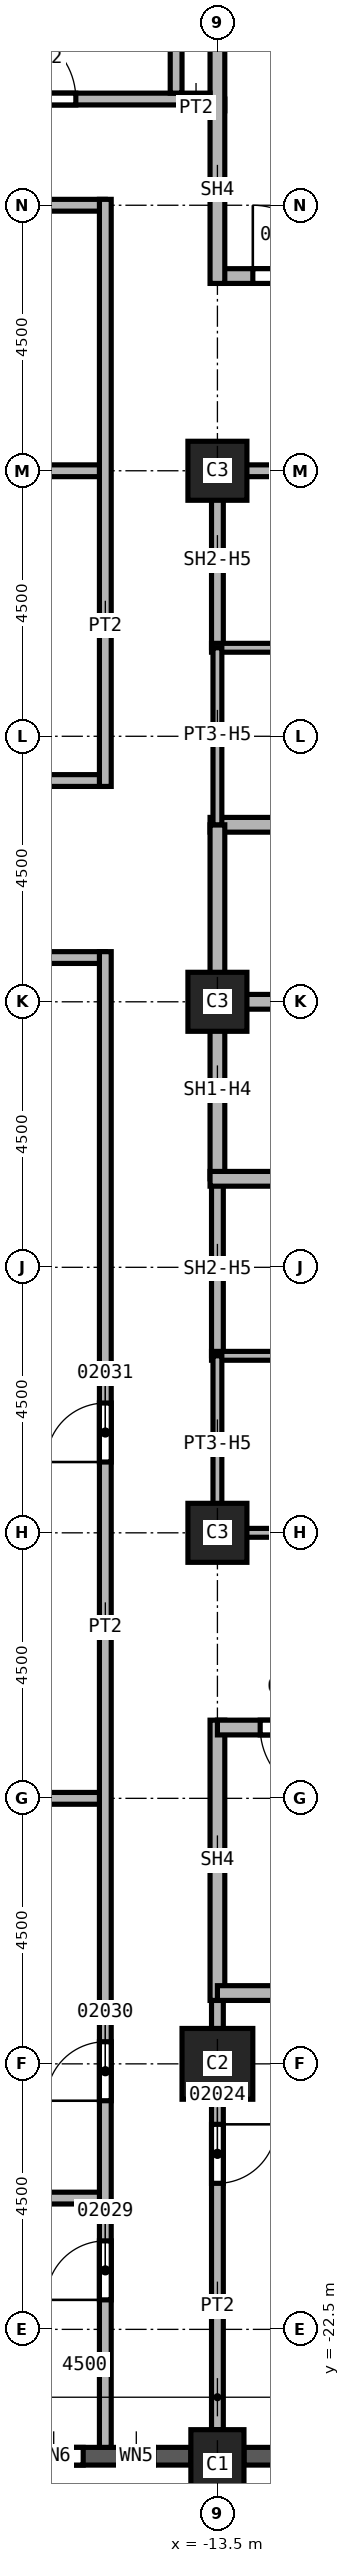
"""IFC4 building model, lengths in metres.
Left out: names, types, materials, properties, quantities, classifications, styles, units other than length and angle.
Written with IfcOpenShell. Run it as: python <this file> out.ifc"""

import sys

from ifc_helpers import new_model, si_unit, direction, frame, frame_2d, origin, origin_2d, place, context, subcontext, project, spatial, rectangle, extrude, element, fill, save


model = new_model("IFC4")
c1 = context("Model", 3, precision=1e-05, world=origin(), true_north=direction((0.0, 1.0)))
c2 = subcontext(c1, "Body", "Model", "MODEL_VIEW")
j1 = project(units=[si_unit("LENGTHUNIT", "METRE"), si_unit("PLANEANGLEUNIT", "RADIAN")], contexts=[c1])
p1 = place(None, origin())
s1 = spatial("IfcSite", under=j1, at=p1, CompositionType="ELEMENT")
p2 = place(p1, origin())
s2 = spatial("IfcBuilding", under=s1, at=p2, CompositionType="ELEMENT")
p3 = place(p2, frame((0.0, 0.0, 80.0)))
s3 = spatial("IfcBuildingStorey", under=s2, at=p3, CompositionType="ELEMENT", Elevation=80.0)
p4 = place(p3, frame((-13.5, -18.0, 0.0), z_axis=(0.0, 0.0, 1.0), x_axis=(1.0, 0.0, 0.0)))
e1 = element("IfcColumn", 1, at=p4, inside=s3, PredefinedType="COLUMN", context=c2, shape_type="SweptSolid", body=[
    extrude(rectangle(XDim=1.2, YDim=1.2, at=origin_2d()), origin(), (0.0, 0.0, 1.0), 3.7),
])
for number, where, z_axis, x_axis in (
    (2, (-13.5, 0.0, 0.0), (0.0, 0.0, 1.0), (1.0, 0.0, 0.0)),
    (3, (-13.5, 9.0, 0.0), (0.0, 0.0, 1.0), (1.0, 0.0, 0.0)),
    (4, (-13.5, -9.0, 0.0), (0.0, 0.0, 1.0), (1.0, 0.0, 0.0)),
):
    element("IfcColumn", number, at=place(p3, frame(where, z_axis=z_axis, x_axis=x_axis)), inside=s3, PredefinedType="COLUMN", context=c2, shape_type="SweptSolid", body=[
        extrude(rectangle(XDim=1.0, YDim=1.0, at=origin_2d()), origin(), (0.0, 0.0, 1.0), 3.7),
    ])
p5 = place(p3, frame((-13.5, -24.8, 0.0), z_axis=(0.0, 0.0, 1.0), x_axis=(1.0, 0.0, 0.0)))
e5 = element("IfcColumn", 5, at=p5, inside=s3, PredefinedType="COLUMN", context=c2, shape_type="SweptSolid", body=[
    extrude(rectangle(XDim=0.9, YDim=1.2, at=origin_2d()), origin(), (0.0, 0.0, 1.0), 3.7),
])
p6 = place(p3, frame((-17.55, -24.65, 0.0), z_axis=(0.0, 0.0, 1.0), x_axis=(1.0, 0.0, 0.0)))
e6 = element("IfcWall", 6, at=p6, inside=s3, PredefinedType="SOLIDWALL", context=c2, shape_type="SweptSolid", body=[
    extrude(rectangle(XDim=3.6, YDim=0.3, at=frame_2d((1.8, 0.0))), origin(), (0.0, 0.0, 1.0), 3.1),
])
p7 = place(p6, frame((0.775, 0.0, 0.8)))
e7 = element("IfcOpeningElement", 7, at=p7, cuts=e6, PredefinedType="OPENING", context=c2, shape_type="SweptSolid", body=[
    extrude(rectangle(XDim=1.0, YDim=1.95, at=frame_2d((0.5, 0.975))), frame((0.0, 0.15, 0.0), z_axis=(0.0, -1.0, 0.0), x_axis=(1.0, 0.0, 0.0)), (0.0, 0.0, 1.0), 0.3),
])
p8 = place(p6, frame((2.375, 0.0, 0.8)))
e8 = element("IfcOpeningElement", 8, at=p8, cuts=e6, PredefinedType="OPENING", context=c2, shape_type="SweptSolid", body=[
    extrude(rectangle(XDim=0.6, YDim=1.95, at=frame_2d((0.3, 0.975))), frame((0.0, 0.15, 0.0), z_axis=(0.0, -1.0, 0.0), x_axis=(1.0, 0.0, 0.0)), (0.0, 0.0, 1.0), 0.3),
])
p9 = place(p3, frame((-13.05, -24.65, 0.0), z_axis=(0.0, 0.0, 1.0), x_axis=(1.0, 0.0, 0.0)))
e9 = element("IfcWall", 9, at=p9, inside=s3, PredefinedType="SOLIDWALL", context=c2, shape_type="SweptSolid", body=[
    extrude(rectangle(XDim=3.6, YDim=0.3, at=frame_2d((1.8, 0.0))), origin(), (0.0, 0.0, 1.0), 3.1),
])
p10 = place(p9, frame((0.6, 0.0, 0.8)))
e10 = element("IfcOpeningElement", 10, at=p10, cuts=e9, PredefinedType="OPENING", context=c2, shape_type="SweptSolid", body=[
    extrude(rectangle(XDim=2.4, YDim=1.95, at=frame_2d((1.2, 0.975))), frame((0.0, 0.15, 0.0), z_axis=(0.0, -1.0, 0.0), x_axis=(1.0, 0.0, 0.0)), (0.0, 0.0, 1.0), 0.3),
])
p11 = place(p3, frame((-33.85, 3.75, 0.0), z_axis=(0.0, 0.0, 1.0), x_axis=(1.0, 0.0, 0.0)))
e11 = element("IfcWall", 11, at=p11, inside=s3, PredefinedType="PARTITIONING", context=c2, shape_type="SweptSolid", body=[
    extrude(rectangle(XDim=18.45, YDim=0.2, at=frame_2d((9.225, 0.0))), origin(), (0.0, 0.0, 1.0), 3.7),
])
p12 = place(p11, frame((9.4, 0.0, 0.0)))
e12 = element("IfcOpeningElement", 12, at=p12, cuts=e11, PredefinedType="OPENING", context=c2, shape_type="SweptSolid", body=[
    extrude(rectangle(XDim=1.0, YDim=2.1, at=frame_2d((0.5, 1.05))), frame((0.0, 0.1, 0.0), z_axis=(0.0, -1.0, 0.0), x_axis=(1.0, 0.0, 0.0)), (0.0, 0.0, 1.0), 0.2),
])
p13 = place(p3, frame((-15.4, 0.75, 0.0), z_axis=(0.0, 0.0, 1.0), x_axis=(-1.0, 0.0, 0.0)))
e13 = element("IfcWall", 13, at=p13, inside=s3, PredefinedType="PARTITIONING", context=c2, shape_type="SweptSolid", body=[
    extrude(rectangle(XDim=18.45, YDim=0.2, at=frame_2d((9.225, 0.0))), origin(), (0.0, 0.0, 1.0), 3.7),
])
p14 = place(p13, frame((12.35, 0.0, 0.0)))
e14 = element("IfcOpeningElement", 14, at=p14, cuts=e13, PredefinedType="OPENING", context=c2, shape_type="SweptSolid", body=[
    extrude(rectangle(XDim=1.0, YDim=2.1, at=frame_2d((0.5, 1.05))), frame((0.0, 0.1, 0.0), z_axis=(0.0, -1.0, 0.0), x_axis=(1.0, 0.0, 0.0)), (0.0, 0.0, 1.0), 0.2),
])
for number, where, z_axis, x_axis in (
    (15, (-27.1, -13.5, 0.0), (0.0, 0.0, 1.0), (1.0, 0.0, 0.0)),
    (16, (-27.1, 9.0, 0.0), (0.0, 0.0, 1.0), (1.0, 0.0, 0.0)),
):
    element("IfcWall", number, at=place(p3, frame(where, z_axis=z_axis, x_axis=x_axis)), inside=s3, PredefinedType="PARTITIONING", context=c2, shape_type="SweptSolid", body=[
        extrude(rectangle(XDim=11.7, YDim=0.2, at=frame_2d((5.85, 0.0))), origin(), (0.0, 0.0, 1.0), 3.7),
    ])
p15 = place(p3, frame((-24.3, -20.275, 0.0), z_axis=(0.0, 0.0, 1.0), x_axis=(1.0, 0.0, 0.0)))
e17 = element("IfcWall", 17, at=p15, inside=s3, PredefinedType="PARTITIONING", context=c2, shape_type="SweptSolid", body=[
    extrude(rectangle(XDim=8.9, YDim=0.2, at=frame_2d((4.45, 0.0))), origin(), (0.0, 0.0, 1.0), 3.7),
])
p16 = place(p3, frame((-15.4, 13.5, 0.0), z_axis=(0.0, 0.0, 1.0), x_axis=(-1.0, 0.0, 0.0)))
e18 = element("IfcWall", 18, at=p16, inside=s3, PredefinedType="PARTITIONING", context=c2, shape_type="SweptSolid", body=[
    extrude(rectangle(XDim=6.6, YDim=0.2, at=frame_2d((3.3, 0.0))), origin(), (0.0, 0.0, 1.0), 3.7),
])
p17 = place(p16, frame((4.0, 0.0, 0.0)))
e19 = element("IfcOpeningElement", 19, at=p17, cuts=e18, PredefinedType="OPENING", context=c2, shape_type="SweptSolid", body=[
    extrude(rectangle(XDim=1.0, YDim=2.1, at=frame_2d((0.5, 1.05))), frame((0.0, 0.1, 0.0), z_axis=(0.0, -1.0, 0.0), x_axis=(1.0, 0.0, 0.0)), (0.0, 0.0, 1.0), 0.2),
])
p18 = place(p3, frame((-15.4, -24.5, 0.0), z_axis=(0.0, 0.0, 1.0), x_axis=(0.0, 1.0, 0.0)))
e20 = element("IfcWall", 20, at=p18, inside=s3, PredefinedType="PARTITIONING", context=c2, shape_type="SweptSolid", body=[
    extrude(rectangle(XDim=25.35, YDim=0.2, at=frame_2d((12.675, 0.0))), origin(), (0.0, 0.0, 1.0), 3.7),
])
p19 = place(p18, frame((2.5, 0.0, 0.0)))
e21 = element("IfcOpeningElement", 21, at=p19, cuts=e20, PredefinedType="OPENING", context=c2, shape_type="SweptSolid", body=[
    extrude(rectangle(XDim=1.0, YDim=2.1, at=frame_2d((0.5, 1.05))), frame((0.0, 0.1, 0.0), z_axis=(0.0, -1.0, 0.0), x_axis=(1.0, 0.0, 0.0)), (0.0, 0.0, 1.0), 0.2),
])
p20 = place(p18, frame((5.875, 0.0, 0.0)))
e22 = element("IfcOpeningElement", 22, at=p20, cuts=e20, PredefinedType="OPENING", context=c2, shape_type="SweptSolid", body=[
    extrude(rectangle(XDim=1.0, YDim=2.1, at=frame_2d((0.5, 1.05))), frame((0.0, 0.1, 0.0), z_axis=(0.0, -1.0, 0.0), x_axis=(1.0, 0.0, 0.0)), (0.0, 0.0, 1.0), 0.2),
])
p21 = place(p18, frame((16.7, 0.0, 0.0)))
e23 = element("IfcOpeningElement", 23, at=p21, cuts=e20, PredefinedType="OPENING", context=c2, shape_type="SweptSolid", body=[
    extrude(rectangle(XDim=1.0, YDim=2.1, at=frame_2d((0.5, 1.05))), frame((0.0, 0.1, 0.0), z_axis=(0.0, -1.0, 0.0), x_axis=(1.0, 0.0, 0.0)), (0.0, 0.0, 1.0), 0.2),
])
p22 = place(p3, frame((-15.4, 3.65, 0.0), z_axis=(0.0, 0.0, 1.0), x_axis=(0.0, 1.0, 0.0)))
e24 = element("IfcWall", 24, at=p22, inside=s3, PredefinedType="PARTITIONING", context=c2, shape_type="SweptSolid", body=[
    extrude(rectangle(XDim=9.95, YDim=0.2, at=frame_2d((4.975, 0.0))), origin(), (0.0, 0.0, 1.0), 3.7),
])
p23 = place(p3, frame((-14.1, 15.2, 0.0), z_axis=(0.0, 0.0, 1.0), x_axis=(1.0, 0.0, 0.0)))
e25 = element("IfcWall", 25, at=p23, inside=s3, PredefinedType="PARTITIONING", context=c2, shape_type="SweptSolid", body=[
    extrude(rectangle(XDim=0.725, YDim=0.2, at=frame_2d((0.363, 0.0))), origin(), (0.0, 0.0, 1.0), 3.7),
])
p24 = place(p3, frame((-13.5, -16.675, 0.0), z_axis=(0.0, 0.0, 1.0), x_axis=(0.0, -1.0, 0.0)))
e26 = element("IfcWall", 26, at=p24, inside=s3, PredefinedType="PARTITIONING", context=c2, shape_type="SweptSolid", body=[
    extrude(rectangle(XDim=7.525, YDim=0.2, at=frame_2d((3.762, 0.0))), origin(), (0.0, 0.0, 1.0), 3.7),
])
p25 = place(p24, frame((2.35, 0.0, 0.0)))
e27 = element("IfcOpeningElement", 27, at=p25, cuts=e26, PredefinedType="OPENING", context=c2, shape_type="SweptSolid", body=[
    extrude(rectangle(XDim=1.0, YDim=2.1, at=frame_2d((0.5, 1.05))), frame((0.0, 0.1, 0.0), z_axis=(0.0, -1.0, 0.0), x_axis=(1.0, 0.0, 0.0)), (0.0, 0.0, 1.0), 0.2),
])
p26 = place(p3, frame((-13.5, -6.0, 0.0), z_axis=(0.0, 0.0, 1.0), x_axis=(0.0, 1.0, 0.0)))
e28 = element("IfcWall", 28, at=p26, inside=s3, PredefinedType="SOLIDWALL", context=c2, shape_type="SweptSolid", body=[
    extrude(rectangle(XDim=3.0, YDim=0.2, at=frame_2d((1.5, 0.0))), origin(), (0.0, 0.0, 1.0), 2.938),
])
p27 = place(p3, frame((-13.5, 6.0, 0.0), z_axis=(0.0, 0.0, 1.0), x_axis=(0.0, 1.0, 0.0)))
e29 = element("IfcWall", 29, at=p27, inside=s3, PredefinedType="SOLIDWALL", context=c2, shape_type="SweptSolid", body=[
    extrude(rectangle(XDim=3.1, YDim=0.2, at=frame_2d((1.55, 0.0))), origin(), (0.0, 0.0, 1.0), 2.938),
])
p28 = place(p3, frame((-13.5, 9.0, 0.0), z_axis=(0.0, 0.0, 1.0), x_axis=(1.0, 0.0, 0.0)))
e30 = element("IfcWall", 30, at=p28, inside=s3, PredefinedType="SOLIDWALL", context=c2, shape_type="SweptSolid", body=[
    extrude(rectangle(XDim=3.0, YDim=0.2, at=frame_2d((1.5, 0.0))), origin(), (0.0, 0.0, 1.0), 2.938),
])
p29 = place(p3, frame((-13.625, 0.0, 0.0), z_axis=(0.0, 0.0, 1.0), x_axis=(1.0, 0.0, 0.0)))
e31 = element("IfcWall", 31, at=p29, inside=s3, PredefinedType="SOLIDWALL", context=c2, shape_type="SweptSolid", body=[
    extrude(rectangle(XDim=3.125, YDim=0.25, at=frame_2d((1.562, 0.0))), origin(), (0.0, 0.0, 1.0), 3.7),
])
p30 = place(p3, frame((-13.625, 3.0, 0.0), z_axis=(0.0, 0.0, 1.0), x_axis=(1.0, 0.0, 0.0)))
e32 = element("IfcWall", 32, at=p30, inside=s3, PredefinedType="SOLIDWALL", context=c2, shape_type="SweptSolid", body=[
    extrude(rectangle(XDim=6.125, YDim=0.25, at=frame_2d((3.062, 0.0))), origin(), (0.0, 0.0, 1.0), 3.7),
])
p31 = place(p30, frame((3.25, 0.0, 0.0)))
e33 = element("IfcOpeningElement", 33, at=p31, cuts=e32, PredefinedType="OPENING", context=c2, shape_type="SweptSolid", body=[
    extrude(rectangle(XDim=1.1, YDim=2.1, at=frame_2d((0.55, 1.05))), frame((0.0, 0.125, 0.0), z_axis=(0.0, -1.0, 0.0), x_axis=(1.0, 0.0, 0.0)), (0.0, 0.0, 1.0), 0.25),
])
p32 = place(p3, frame((-13.5, -3.0, 0.0), z_axis=(0.0, 0.0, 1.0), x_axis=(0.0, 1.0, 0.0)))
e34 = element("IfcWall", 34, at=p32, inside=s3, PredefinedType="SOLIDWALL", context=c2, shape_type="SweptSolid", body=[
    extrude(rectangle(XDim=6.0, YDim=0.25, at=frame_2d((3.0, 0.0))), origin(), (0.0, 0.0, 1.0), 2.938),
])
p33 = place(p3, frame((-13.625, -3.0, 0.0), z_axis=(0.0, 0.0, 1.0), x_axis=(1.0, 0.0, 0.0)))
e35 = element("IfcWall", 35, at=p33, inside=s3, PredefinedType="SOLIDWALL", context=c2, shape_type="SweptSolid", body=[
    extrude(rectangle(XDim=9.25, YDim=0.25, at=frame_2d((4.625, 0.0))), origin(), (0.0, 0.0, 1.0), 3.7),
])
p34 = place(p33, frame((3.25, 0.0, 0.0)))
e36 = element("IfcOpeningElement", 36, at=p34, cuts=e35, PredefinedType="OPENING", context=c2, shape_type="SweptSolid", body=[
    extrude(rectangle(XDim=1.1, YDim=2.1, at=frame_2d((0.55, 1.05))), frame((0.0, 0.125, 0.0), z_axis=(0.0, -1.0, 0.0), x_axis=(1.0, 0.0, 0.0)), (0.0, 0.0, 1.0), 0.25),
])
p35 = place(p3, frame((-13.5, -12.175, 0.0), z_axis=(0.0, 0.0, 1.0), x_axis=(0.0, -1.0, 0.0)))
e37 = element("IfcWall", 37, at=p35, inside=s3, PredefinedType="SOLIDWALL", context=c2, shape_type="SweptSolid", body=[
    extrude(rectangle(XDim=4.75, YDim=0.25, at=frame_2d((2.375, 0.0))), origin(), (0.0, 0.0, 1.0), 3.7),
])
p36 = place(p3, frame((-13.5, 12.3, 0.0), z_axis=(0.0, 0.0, 1.0), x_axis=(1.0, 0.0, 0.0)))
e38 = element("IfcWall", 38, at=p36, inside=s3, PredefinedType="SOLIDWALL", context=c2, shape_type="SweptSolid", body=[
    extrude(rectangle(XDim=9.125, YDim=0.25, at=frame_2d((4.562, 0.0))), origin(), (0.0, 0.0, 1.0), 3.7),
])
p37 = place(p36, frame((0.6, 0.0, 0.0)))
e39 = element("IfcOpeningElement", 39, at=p37, cuts=e38, PredefinedType="OPENING", context=c2, shape_type="SweptSolid", body=[
    extrude(rectangle(XDim=1.2, YDim=2.1, at=frame_2d((0.6, 1.05))), frame((0.0, 0.125, 0.0), z_axis=(0.0, -1.0, 0.0), x_axis=(1.0, 0.0, 0.0)), (0.0, 0.0, 1.0), 0.25),
])
p38 = place(p3, frame((-13.5, 12.175, 0.0), z_axis=(0.0, 0.0, 1.0), x_axis=(0.0, 1.0, 0.0)))
e40 = element("IfcWall", 40, at=p38, inside=s3, PredefinedType="SOLIDWALL", context=c2, shape_type="SweptSolid", body=[
    extrude(rectangle(XDim=4.75, YDim=0.25, at=frame_2d((2.375, 0.0))), origin(), (0.0, 0.0, 1.0), 3.7),
])
p39 = place(p3, frame((-4.5, -16.8, 0.0), z_axis=(0.0, 0.0, 1.0), x_axis=(-1.0, 0.0, 0.0)))
e41 = element("IfcWall", 41, at=p39, inside=s3, PredefinedType="SOLIDWALL", context=c2, shape_type="SweptSolid", body=[
    extrude(rectangle(XDim=9.0, YDim=0.25, at=frame_2d((4.5, 0.0))), origin(), (0.0, 0.0, 1.0), 3.7),
])
p40 = place(p3, frame((-4.375, -12.3, 0.0), z_axis=(0.0, 0.0, 1.0), x_axis=(-1.0, 0.0, 0.0)))
e42 = element("IfcWall", 42, at=p40, inside=s3, PredefinedType="SOLIDWALL", context=c2, shape_type="SweptSolid", body=[
    extrude(rectangle(XDim=9.125, YDim=0.25, at=frame_2d((4.562, 0.0))), origin(), (0.0, 0.0, 1.0), 3.7),
])
p41 = place(p40, frame((7.2, 0.0, 0.0)))
e43 = element("IfcOpeningElement", 43, at=p41, cuts=e42, PredefinedType="OPENING", context=c2, shape_type="SweptSolid", body=[
    extrude(rectangle(XDim=1.2, YDim=2.1, at=frame_2d((0.6, 1.05))), frame((0.0, 0.125, 0.0), z_axis=(0.0, -1.0, 0.0), x_axis=(1.0, 0.0, 0.0)), (0.0, 0.0, 1.0), 0.25),
])
for number, where, z_axis, x_axis in (
    (44, (-13.6, -6.0, 0.0), (0.0, 0.0, 1.0), (1.0, 0.0, 0.0)),
    (45, (-13.6, 6.0, 0.0), (0.0, 0.0, 1.0), (1.0, 0.0, 0.0)),
):
    element("IfcWall", number, at=place(p3, frame(where, z_axis=z_axis, x_axis=x_axis)), inside=s3, PredefinedType="PARTITIONING", context=c2, shape_type="SweptSolid", body=[
        extrude(rectangle(XDim=3.1, YDim=0.15, at=frame_2d((1.55, 0.0))), origin(), (0.0, 0.0, 1.0), 3.7),
    ])
p42 = place(p3, frame((-13.5, -9.075, 0.0), z_axis=(0.0, 0.0, 1.0), x_axis=(0.0, 1.0, 0.0)))
e46 = element("IfcWall", 46, at=p42, inside=s3, PredefinedType="PARTITIONING", context=c2, shape_type="SweptSolid", body=[
    extrude(rectangle(XDim=3.075, YDim=0.15, at=frame_2d((1.538, 0.0))), origin(), (0.0, 0.0, 1.0), 2.938),
])
for number, where, z_axis, x_axis in (
    (47, (-13.5, 3.0, 0.0), (0.0, 0.0, 1.0), (0.0, 1.0, 0.0)),
    (48, (-10.5, -9.0, 0.0), (0.0, 0.0, 1.0), (-1.0, 0.0, 0.0)),
):
    element("IfcWall", number, at=place(p3, frame(where, z_axis=z_axis, x_axis=x_axis)), inside=s3, PredefinedType="PARTITIONING", context=c2, shape_type="SweptSolid", body=[
        extrude(rectangle(XDim=3.0, YDim=0.15, at=frame_2d((1.5, 0.0))), origin(), (0.0, 0.0, 1.0), 2.938),
    ])
p43 = place(p3, frame((-21.9, 15.3, 0.0), z_axis=(0.0, 0.0, 1.0), x_axis=(1.0, 0.0, 0.0)))
e49 = element("IfcWall", 49, at=p43, inside=s3, PredefinedType="SOLIDWALL", context=c2, shape_type="SweptSolid", body=[
    extrude(rectangle(XDim=8.275, YDim=0.2, at=frame_2d((4.137, 0.0))), origin(), (0.0, 0.0, 1.0), 3.7),
])
p44 = place(p43, frame((4.8, 0.0, 0.0)))
e50 = element("IfcOpeningElement", 50, at=p44, cuts=e49, PredefinedType="OPENING", context=c2, shape_type="SweptSolid", body=[
    extrude(rectangle(XDim=1.2, YDim=2.1, at=frame_2d((0.6, 1.05))), frame((0.0, 0.1, 0.0), z_axis=(0.0, -1.0, 0.0), x_axis=(1.0, 0.0, 0.0)), (0.0, 0.0, 1.0), 0.2),
])
p45 = place(p3, frame((-14.2, 15.4, 0.0), z_axis=(0.0, 0.0, 1.0), x_axis=(0.0, 1.0, 0.0)))
e51 = element("IfcWall", 51, at=p45, inside=s3, PredefinedType="SOLIDWALL", context=c2, shape_type="SweptSolid", body=[
    extrude(rectangle(XDim=5.9, YDim=0.2, at=frame_2d((2.95, 0.0))), origin(), (0.0, 0.0, 1.0), 3.7),
])
p46 = place(p37, origin())
e52 = element("IfcDoor", 52, at=p46, inside=s3, OperationType="SINGLE_SWING_LEFT", PredefinedType="DOOR", context=c2, shape_type="SweptSolid", body=[
    extrude(rectangle(XDim=1.2, YDim=2.1, at=frame_2d((0.6, 1.05))), frame((0.0, 0.025, 0.0), z_axis=(0.0, -1.0, 0.0), x_axis=(1.0, 0.0, 0.0)), (0.0, 0.0, 1.0), 0.05),
])
fill(e39, e52)
p47 = place(p41, origin())
e53 = element("IfcDoor", 53, at=p47, inside=s3, OperationType="SINGLE_SWING_RIGHT", PredefinedType="DOOR", context=c2, shape_type="SweptSolid", body=[
    extrude(rectangle(XDim=1.2, YDim=2.1, at=frame_2d((0.6, 1.05))), frame((0.0, 0.025, 0.0), z_axis=(0.0, -1.0, 0.0), x_axis=(1.0, 0.0, 0.0)), (0.0, 0.0, 1.0), 0.05),
])
fill(e43, e53)
p48 = place(p25, origin())
e54 = element("IfcDoor", 54, at=p48, inside=s3, OperationType="SINGLE_SWING_LEFT", PredefinedType="DOOR", context=c2, shape_type="SweptSolid", body=[
    extrude(rectangle(XDim=1.0, YDim=2.1, at=frame_2d((0.5, 1.05))), frame((0.0, 0.025, 0.0), z_axis=(0.0, -1.0, 0.0), x_axis=(1.0, 0.0, 0.0)), (0.0, 0.0, 1.0), 0.05),
])
fill(e27, e54)
p49 = place(p19, origin())
e55 = element("IfcDoor", 55, at=p49, inside=s3, OperationType="SINGLE_SWING_RIGHT", PredefinedType="DOOR", context=c2, shape_type="SweptSolid", body=[
    extrude(rectangle(XDim=1.0, YDim=2.1, at=frame_2d((0.5, 1.05))), frame((0.0, 0.025, 0.0), z_axis=(0.0, -1.0, 0.0), x_axis=(1.0, 0.0, 0.0)), (0.0, 0.0, 1.0), 0.05),
])
fill(e21, e55)
p50 = place(p20, origin())
e56 = element("IfcDoor", 56, at=p50, inside=s3, OperationType="SINGLE_SWING_LEFT", PredefinedType="DOOR", context=c2, shape_type="SweptSolid", body=[
    extrude(rectangle(XDim=1.0, YDim=2.1, at=frame_2d((0.5, 1.05))), frame((0.0, 0.025, 0.0), z_axis=(0.0, -1.0, 0.0), x_axis=(1.0, 0.0, 0.0)), (0.0, 0.0, 1.0), 0.05),
])
fill(e22, e56)
p51 = place(p21, origin())
e57 = element("IfcDoor", 57, at=p51, inside=s3, OperationType="SINGLE_SWING_RIGHT", PredefinedType="DOOR", context=c2, shape_type="SweptSolid", body=[
    extrude(rectangle(XDim=1.0, YDim=2.1, at=frame_2d((0.5, 1.05))), frame((0.0, 0.025, 0.0), z_axis=(0.0, -1.0, 0.0), x_axis=(1.0, 0.0, 0.0)), (0.0, 0.0, 1.0), 0.05),
])
fill(e23, e57)
p52 = place(p44, origin())
e58 = element("IfcDoor", 58, at=p52, inside=s3, OperationType="SINGLE_SWING_RIGHT", PredefinedType="DOOR", context=c2, shape_type="SweptSolid", body=[
    extrude(rectangle(XDim=1.2, YDim=2.1, at=frame_2d((0.6, 1.05))), frame((0.0, 0.025, 0.0), z_axis=(0.0, -1.0, 0.0), x_axis=(1.0, 0.0, 0.0)), (0.0, 0.0, 1.0), 0.05),
])
fill(e50, e58)
p53 = place(p7, origin())
e59 = element("IfcWindow", 59, at=p53, inside=s3, PartitioningType="SINGLE_PANEL", PredefinedType="WINDOW", context=c2, shape_type="SweptSolid", body=[
    extrude(rectangle(XDim=1.0, YDim=1.95, at=frame_2d((0.5, 0.975))), frame((0.0, 0.03, 0.0), z_axis=(0.0, -1.0, 0.0), x_axis=(1.0, 0.0, 0.0)), (0.0, 0.0, 1.0), 0.06),
])
fill(e7, e59)
p54 = place(p8, origin())
e60 = element("IfcWindow", 60, at=p54, inside=s3, PartitioningType="SINGLE_PANEL", PredefinedType="WINDOW", context=c2, shape_type="SweptSolid", body=[
    extrude(rectangle(XDim=0.6, YDim=1.95, at=frame_2d((0.3, 0.975))), frame((0.0, 0.03, 0.0), z_axis=(0.0, -1.0, 0.0), x_axis=(1.0, 0.0, 0.0)), (0.0, 0.0, 1.0), 0.06),
])
fill(e8, e60)
save(model, sys.argv[1])
